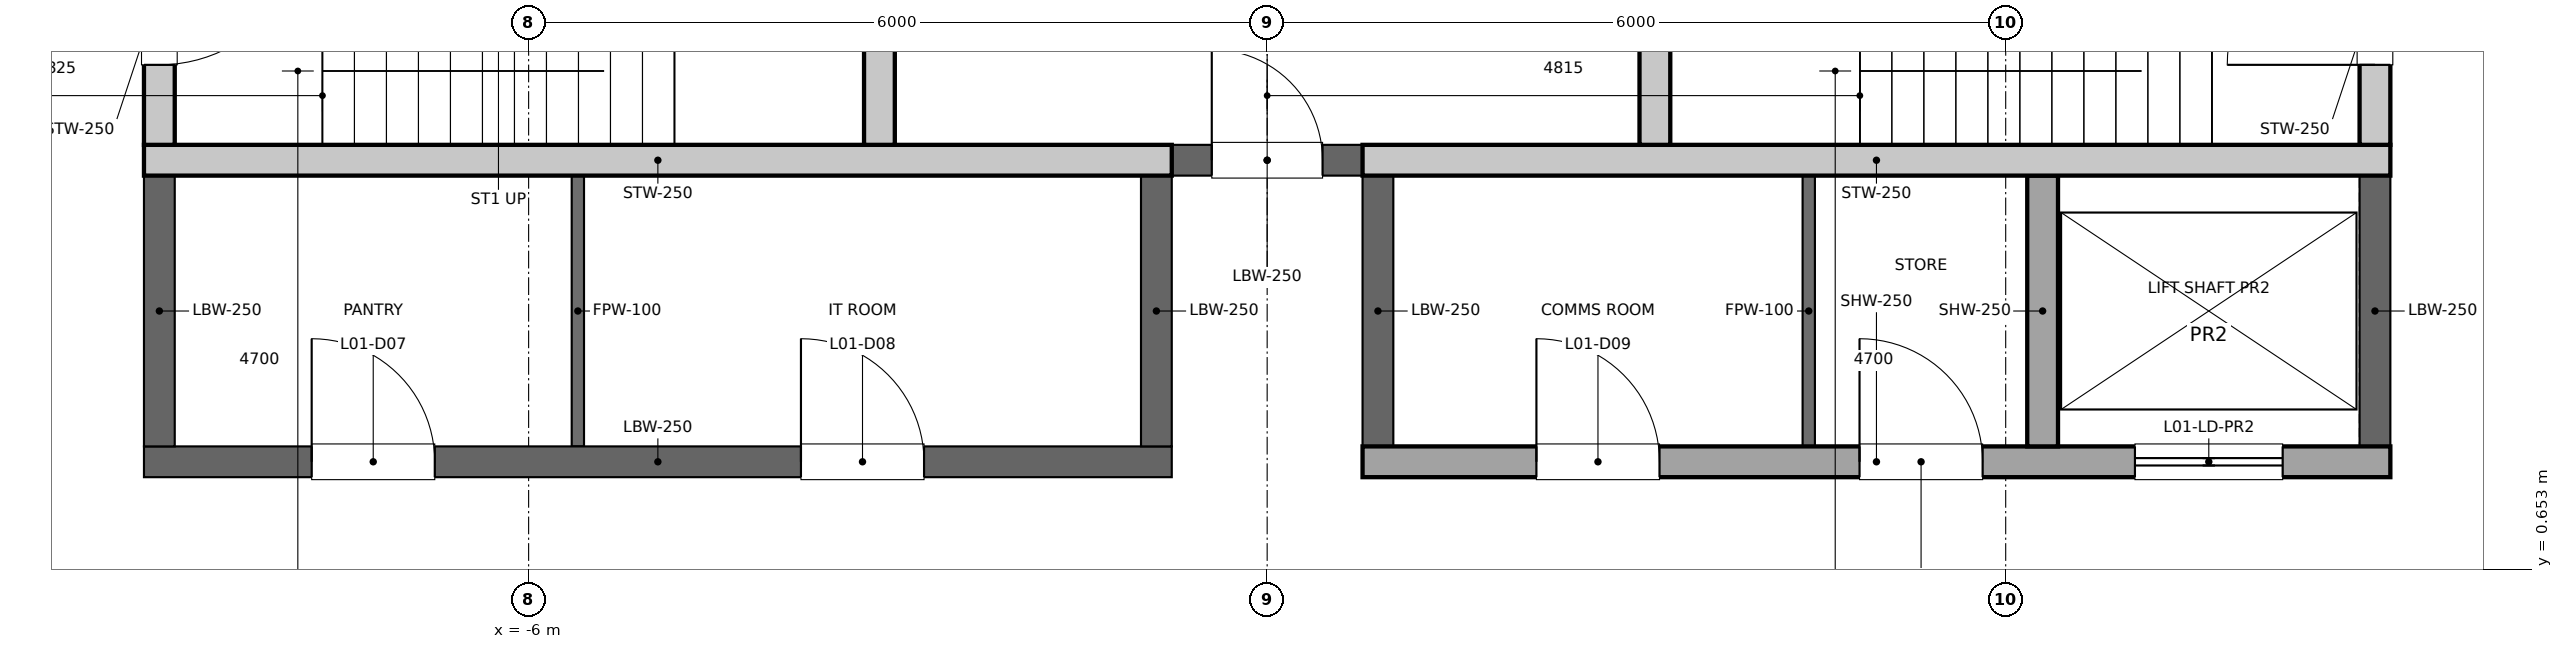
"""IFC4 building model, lengths in metres.
Left out: names, types, materials, properties, quantities, classifications, styles, units other than length and angle.
Written with IfcOpenShell. Run it as: python <this file> out.ifc"""

import sys

from ifc_helpers import new_model, si_unit, direction, frame, frame_2d, origin, place, context, subcontext, project, spatial, rectangle, extrude, element, fill, save


model = new_model("IFC4")
c1 = context("Model", 3, precision=1e-05, world=origin(), true_north=direction((0.0, 1.0)))
c2 = subcontext(c1, "Body", "Model", "MODEL_VIEW")
j1 = project(units=[si_unit("LENGTHUNIT", "METRE"), si_unit("PLANEANGLEUNIT", "RADIAN")], contexts=[c1])
p1 = place(None, origin())
s1 = spatial("IfcSite", under=j1, at=p1, CompositionType="ELEMENT")
p2 = place(p1, origin())
s2 = spatial("IfcBuilding", under=s1, at=p2, CompositionType="ELEMENT")
p3 = place(p2, frame((0.0, 0.0, 8.0)))
s3 = spatial("IfcBuildingStorey", under=s2, at=p3, CompositionType="ELEMENT", Elevation=8.0)
p4 = place(p3, frame((-9.0, 4.1, 0.0), z_axis=(0.0, 0.0, 1.0), x_axis=(0.0, 1.0, 0.0)))
e1 = element("IfcWall", 1, at=p4, inside=s3, PredefinedType="SOLIDWALL", context=c2, shape_type="SweptSolid", body=[
    extrude(rectangle(XDim=2.5, YDim=0.25, at=frame_2d((1.25, 0.0))), origin(), (0.0, 0.0, 1.0), 8.8),
])
p5 = place(p4, frame((0.65, 0.0, 0.0)))
e2 = element("IfcOpeningElement", 2, at=p5, cuts=e1, PredefinedType="OPENING", context=c2, shape_type="SweptSolid", body=[
    extrude(rectangle(XDim=1.2, YDim=2.1, at=frame_2d((0.6, 1.05))), frame((0.0, 0.125, 0.0), z_axis=(0.0, -1.0, 0.0), x_axis=(1.0, 0.0, 0.0)), (0.0, 0.0, 1.0), 0.25),
])
p6 = place(p3, frame((9.0, 4.1, 0.0), z_axis=(0.0, 0.0, 1.0), x_axis=(0.0, 1.0, 0.0)))
e3 = element("IfcWall", 3, at=p6, inside=s3, PredefinedType="SOLIDWALL", context=c2, shape_type="SweptSolid", body=[
    extrude(rectangle(XDim=2.5, YDim=0.25, at=frame_2d((1.25, 0.0))), origin(), (0.0, 0.0, 1.0), 8.8),
])
p7 = place(p6, frame((0.65, 0.0, 0.0)))
e4 = element("IfcOpeningElement", 4, at=p7, cuts=e3, PredefinedType="OPENING", context=c2, shape_type="SweptSolid", body=[
    extrude(rectangle(XDim=1.2, YDim=2.1, at=frame_2d((0.6, 1.05))), frame((0.0, 0.125, 0.0), z_axis=(0.0, -1.0, 0.0), x_axis=(1.0, 0.0, 0.0)), (0.0, 0.0, 1.0), 0.25),
])
for number, where, z_axis, x_axis in (
    (5, (-3.15, 4.1, 0.0), (0.0, 0.0, 1.0), (0.0, 1.0, 0.0)),
    (6, (3.15, 4.1, 0.0), (0.0, 0.0, 1.0), (0.0, 1.0, 0.0)),
):
    element("IfcWall", number, at=place(p3, frame(where, z_axis=z_axis, x_axis=x_axis)), inside=s3, PredefinedType="SOLIDWALL", context=c2, shape_type="SweptSolid", body=[
        extrude(rectangle(XDim=2.5, YDim=0.25, at=frame_2d((1.25, 0.0))), origin(), (0.0, 0.0, 1.0), 8.8),
    ])
p8 = place(p3, frame((-0.775, 3.975, 0.0), z_axis=(0.0, 0.0, 1.0), x_axis=(1.0, 0.0, 0.0)))
e7 = element("IfcWall", 7, at=p8, inside=s3, PredefinedType="PARTITIONING", context=c2, shape_type="SweptSolid", body=[
    extrude(rectangle(XDim=1.55, YDim=0.25, at=frame_2d((0.775, 0.0))), origin(), (0.0, 0.0, 1.0), 8.8),
])
p9 = place(p8, frame((0.325, 0.0, 0.0)))
e8 = element("IfcOpeningElement", 8, at=p9, cuts=e7, PredefinedType="OPENING", context=c2, shape_type="SweptSolid", body=[
    extrude(rectangle(XDim=0.9, YDim=2.1, at=frame_2d((0.45, 1.05))), frame((0.0, 0.125, 0.0), z_axis=(0.0, -1.0, 0.0), x_axis=(1.0, 0.0, 0.0)), (0.0, 0.0, 1.0), 0.25),
])
p10 = place(p3, frame((-9.125, 1.525, 0.0), z_axis=(0.0, 0.0, 1.0), x_axis=(1.0, 0.0, 0.0)))
e9 = element("IfcWall", 9, at=p10, inside=s3, PredefinedType="PARTITIONING", context=c2, shape_type="SweptSolid", body=[
    extrude(rectangle(XDim=8.35, YDim=0.25, at=frame_2d((4.175, 0.0))), origin(), (0.0, 0.0, 1.0), 8.8),
])
p11 = place(p10, frame((1.363, 0.0, 0.0)))
e10 = element("IfcOpeningElement", 10, at=p11, cuts=e9, PredefinedType="OPENING", context=c2, shape_type="SweptSolid", body=[
    extrude(rectangle(XDim=1.0, YDim=2.1, at=frame_2d((0.5, 1.05))), frame((0.0, 0.125, 0.0), z_axis=(0.0, -1.0, 0.0), x_axis=(1.0, 0.0, 0.0)), (0.0, 0.0, 1.0), 0.25),
])
p12 = place(p10, frame((5.337, 0.0, 0.0)))
e11 = element("IfcOpeningElement", 11, at=p12, cuts=e9, PredefinedType="OPENING", context=c2, shape_type="SweptSolid", body=[
    extrude(rectangle(XDim=1.0, YDim=2.1, at=frame_2d((0.5, 1.05))), frame((0.0, 0.125, 0.0), z_axis=(0.0, -1.0, 0.0), x_axis=(1.0, 0.0, 0.0)), (0.0, 0.0, 1.0), 0.25),
])
p13 = place(p3, frame((0.775, 1.525, 0.0), z_axis=(0.0, 0.0, 1.0), x_axis=(1.0, 0.0, 0.0)))
e12 = element("IfcWall", 12, at=p13, inside=s3, PredefinedType="SOLIDWALL", context=c2, shape_type="SweptSolid", body=[
    extrude(rectangle(XDim=8.35, YDim=0.25, at=frame_2d((4.175, 0.0))), origin(), (0.0, 0.0, 1.0), 8.8),
])
p14 = place(p13, frame((6.275, 0.0, 0.0)))
e13 = element("IfcOpeningElement", 13, at=p14, cuts=e12, PredefinedType="OPENING", context=c2, shape_type="SweptSolid", body=[
    extrude(rectangle(XDim=1.2, YDim=2.1, at=frame_2d((0.6, 1.05))), frame((0.0, 0.125, 0.0), z_axis=(0.0, -1.0, 0.0), x_axis=(1.0, 0.0, 0.0)), (0.0, 0.0, 1.0), 0.25),
])
p15 = place(p13, frame((1.413, 0.0, 0.0)))
e14 = element("IfcOpeningElement", 14, at=p15, cuts=e12, PredefinedType="OPENING", context=c2, shape_type="SweptSolid", body=[
    extrude(rectangle(XDim=1.0, YDim=2.1, at=frame_2d((0.5, 1.05))), frame((0.0, 0.125, 0.0), z_axis=(0.0, -1.0, 0.0), x_axis=(1.0, 0.0, 0.0)), (0.0, 0.0, 1.0), 0.25),
])
p16 = place(p13, frame((4.038, 0.0, 0.0)))
e15 = element("IfcOpeningElement", 15, at=p16, cuts=e12, PredefinedType="OPENING", context=c2, shape_type="SweptSolid", body=[
    extrude(rectangle(XDim=1.0, YDim=2.1, at=frame_2d((0.5, 1.05))), frame((0.0, 0.125, 0.0), z_axis=(0.0, -1.0, 0.0), x_axis=(1.0, 0.0, 0.0)), (0.0, 0.0, 1.0), 0.25),
])
p17 = place(p3, frame((6.3, 1.65, 0.0), z_axis=(0.0, 0.0, 1.0), x_axis=(0.0, 1.0, 0.0)))
e16 = element("IfcWall", 16, at=p17, inside=s3, PredefinedType="SOLIDWALL", context=c2, shape_type="SweptSolid", body=[
    extrude(rectangle(XDim=2.2, YDim=0.25, at=frame_2d((1.1, 0.0))), origin(), (0.0, 0.0, 1.0), 8.8),
])
for number, where, z_axis, x_axis in (
    (17, (-9.125, 3.975, 0.0), (0.0, 0.0, 1.0), (1.0, 0.0, 0.0)),
    (18, (0.775, 3.975, 0.0), (0.0, 0.0, 1.0), (1.0, 0.0, 0.0)),
):
    element("IfcWall", number, at=place(p3, frame(where, z_axis=z_axis, x_axis=x_axis)), inside=s3, PredefinedType="SOLIDWALL", context=c2, shape_type="SweptSolid", body=[
        extrude(rectangle(XDim=8.35, YDim=0.25, at=frame_2d((4.175, 0.0))), origin(), (0.0, 0.0, 1.0), 8.8),
    ])
for number, where, z_axis, x_axis in (
    (19, (-9.0, 1.65, 0.0), (0.0, 0.0, 1.0), (0.0, 1.0, 0.0)),
    (20, (-0.9, 1.65, 0.0), (0.0, 0.0, 1.0), (0.0, 1.0, 0.0)),
    (21, (9.0, 1.65, 0.0), (0.0, 0.0, 1.0), (0.0, 1.0, 0.0)),
    (22, (0.9, 1.65, 0.0), (0.0, 0.0, 1.0), (0.0, 1.0, 0.0)),
):
    element("IfcWall", number, at=place(p3, frame(where, z_axis=z_axis, x_axis=x_axis)), inside=s3, PredefinedType="PARTITIONING", context=c2, shape_type="SweptSolid", body=[
        extrude(rectangle(XDim=2.2, YDim=0.25, at=frame_2d((1.1, 0.0))), origin(), (0.0, 0.0, 1.0), 8.8),
    ])
for number, where, z_axis, x_axis in (
    (23, (-5.6, 1.65, 0.0), (0.0, 0.0, 1.0), (0.0, 1.0, 0.0)),
    (24, (4.4, 1.65, 0.0), (0.0, 0.0, 1.0), (0.0, 1.0, 0.0)),
):
    element("IfcWall", number, at=place(p3, frame(where, z_axis=z_axis, x_axis=x_axis)), inside=s3, PredefinedType="PARTITIONING", context=c2, shape_type="SweptSolid", body=[
        extrude(rectangle(XDim=2.2, YDim=0.1, at=frame_2d((1.1, 0.0))), origin(), (0.0, 0.0, 1.0), 8.8),
    ])
p18 = place(p14, origin())
e25 = element("IfcDoor", 25, at=p18, inside=s3, OperationType="DOUBLE_DOOR_SLIDING", PredefinedType="DOOR", context=c2, shape_type="SweptSolid", body=[
    extrude(rectangle(XDim=1.2, YDim=2.1, at=frame_2d((0.6, 1.05))), frame((0.0, 0.025, 0.0), z_axis=(0.0, -1.0, 0.0), x_axis=(1.0, 0.0, 0.0)), (0.0, 0.0, 1.0), 0.05),
])
fill(e13, e25)
p19 = place(p5, origin())
e26 = element("IfcDoor", 26, at=p19, inside=s3, OperationType="SINGLE_SWING_RIGHT", PredefinedType="DOOR", context=c2, shape_type="SweptSolid", body=[
    extrude(rectangle(XDim=1.2, YDim=2.1, at=frame_2d((0.6, 1.05))), frame((0.0, 0.025, 0.0), z_axis=(0.0, -1.0, 0.0), x_axis=(1.0, 0.0, 0.0)), (0.0, 0.0, 1.0), 0.05),
])
fill(e2, e26)
p20 = place(p7, origin())
e27 = element("IfcDoor", 27, at=p20, inside=s3, OperationType="SINGLE_SWING_LEFT", PredefinedType="DOOR", context=c2, shape_type="SweptSolid", body=[
    extrude(rectangle(XDim=1.2, YDim=2.1, at=frame_2d((0.6, 1.05))), frame((0.0, 0.025, 0.0), z_axis=(0.0, -1.0, 0.0), x_axis=(1.0, 0.0, 0.0)), (0.0, 0.0, 1.0), 0.05),
])
fill(e4, e27)
p21 = place(p9, origin())
e28 = element("IfcDoor", 28, at=p21, inside=s3, OperationType="SINGLE_SWING_LEFT", PredefinedType="DOOR", context=c2, shape_type="SweptSolid", body=[
    extrude(rectangle(XDim=0.9, YDim=2.1, at=frame_2d((0.45, 1.05))), frame((0.0, 0.025, 0.0), z_axis=(0.0, -1.0, 0.0), x_axis=(1.0, 0.0, 0.0)), (0.0, 0.0, 1.0), 0.05),
])
fill(e8, e28)
p22 = place(p11, origin())
e29 = element("IfcDoor", 29, at=p22, inside=s3, OperationType="SINGLE_SWING_LEFT", PredefinedType="DOOR", context=c2, shape_type="SweptSolid", body=[
    extrude(rectangle(XDim=1.0, YDim=2.1, at=frame_2d((0.5, 1.05))), frame((0.0, 0.025, 0.0), z_axis=(0.0, -1.0, 0.0), x_axis=(1.0, 0.0, 0.0)), (0.0, 0.0, 1.0), 0.05),
])
fill(e10, e29)
p23 = place(p12, origin())
e30 = element("IfcDoor", 30, at=p23, inside=s3, OperationType="SINGLE_SWING_LEFT", PredefinedType="DOOR", context=c2, shape_type="SweptSolid", body=[
    extrude(rectangle(XDim=1.0, YDim=2.1, at=frame_2d((0.5, 1.05))), frame((0.0, 0.025, 0.0), z_axis=(0.0, -1.0, 0.0), x_axis=(1.0, 0.0, 0.0)), (0.0, 0.0, 1.0), 0.05),
])
fill(e11, e30)
p24 = place(p15, origin())
e31 = element("IfcDoor", 31, at=p24, inside=s3, OperationType="SINGLE_SWING_LEFT", PredefinedType="DOOR", context=c2, shape_type="SweptSolid", body=[
    extrude(rectangle(XDim=1.0, YDim=2.1, at=frame_2d((0.5, 1.05))), frame((0.0, 0.025, 0.0), z_axis=(0.0, -1.0, 0.0), x_axis=(1.0, 0.0, 0.0)), (0.0, 0.0, 1.0), 0.05),
])
fill(e14, e31)
p25 = place(p16, origin())
e32 = element("IfcDoor", 32, at=p25, inside=s3, OperationType="SINGLE_SWING_LEFT", PredefinedType="DOOR", context=c2, shape_type="SweptSolid", body=[
    extrude(rectangle(XDim=1.0, YDim=2.1, at=frame_2d((0.5, 1.05))), frame((0.0, 0.025, 0.0), z_axis=(0.0, -1.0, 0.0), x_axis=(1.0, 0.0, 0.0)), (0.0, 0.0, 1.0), 0.05),
])
fill(e15, e32)
save(model, sys.argv[1])
